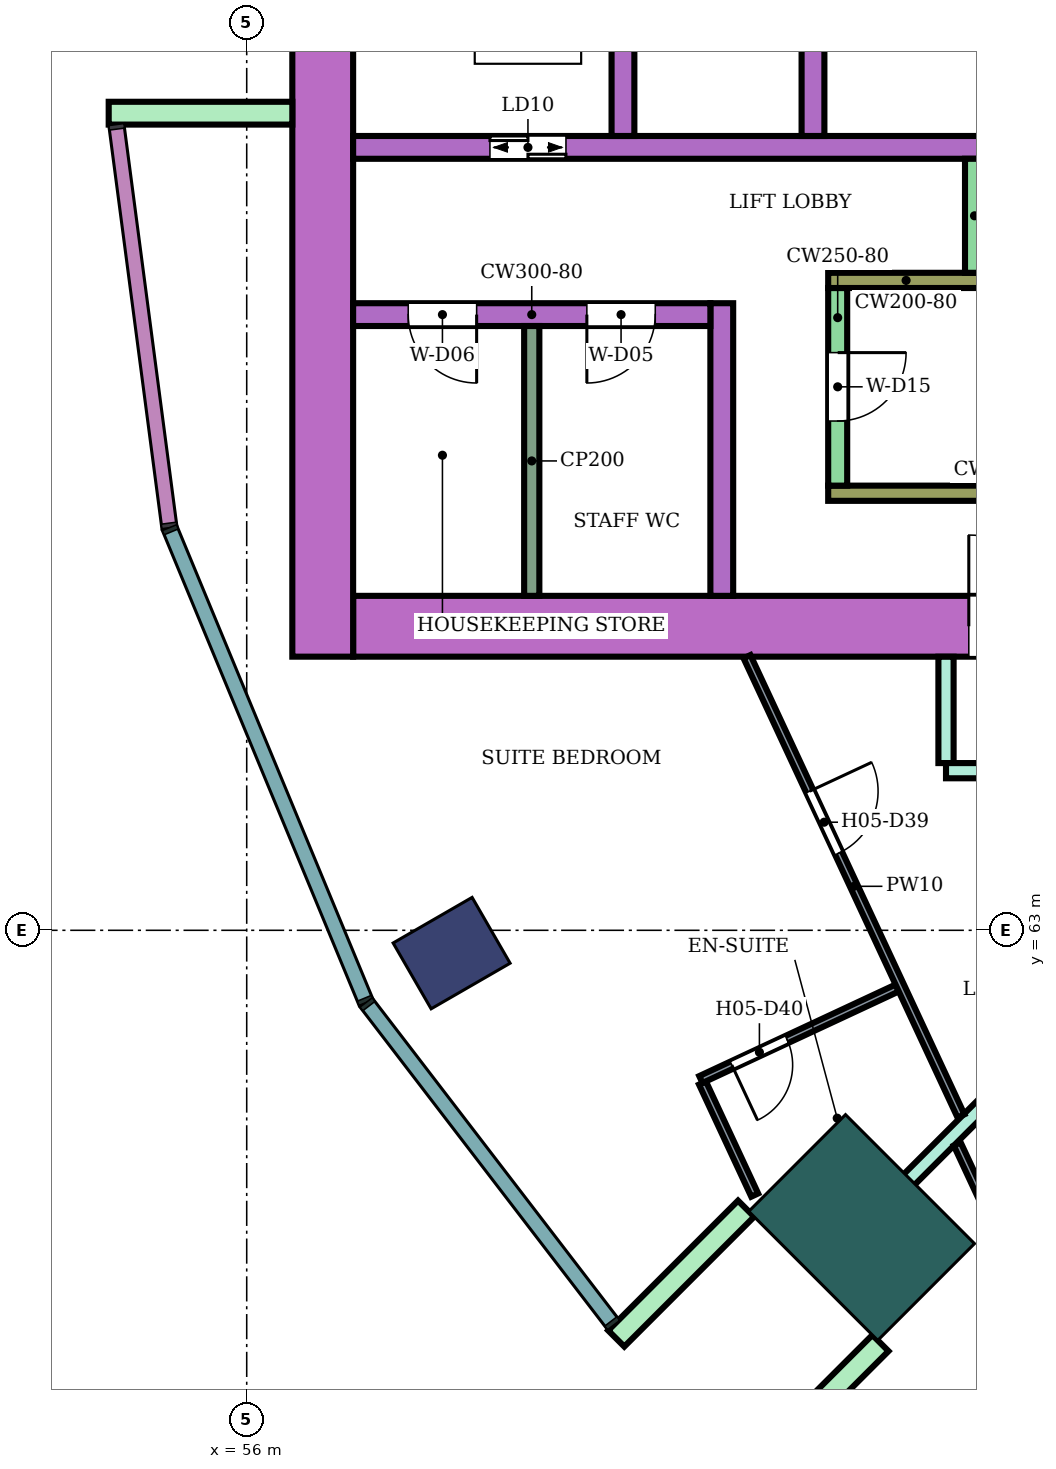
"""IFC4 building model, lengths in metres.
Left out: names, types, materials, properties, quantities, classifications, styles, units other than length and angle.
Written with IfcOpenShell. Run it as: python <this file> out.ifc"""

import sys

from ifc_helpers import new_model, si_unit, direction, frame, frame_2d, origin, origin_2d, place, context, subcontext, project, spatial, rectangle, extrude, element, fill, save


model = new_model("IFC4")
c1 = context("Model", 3, precision=1e-05, world=origin(), true_north=direction((0.0, 1.0)))
c2 = subcontext(c1, "Body", "Model", "MODEL_VIEW")
j1 = project(units=[si_unit("LENGTHUNIT", "METRE"), si_unit("PLANEANGLEUNIT", "RADIAN")], contexts=[c1])
p1 = place(None, origin())
s1 = spatial("IfcSite", under=j1, at=p1, CompositionType="ELEMENT")
p2 = place(p1, origin())
s2 = spatial("IfcBuilding", under=s1, at=p2, CompositionType="ELEMENT")
p3 = place(p2, frame((0.0, 0.0, 86.2)))
s3 = spatial("IfcBuildingStorey", under=s2, at=p3, CompositionType="ELEMENT", Elevation=86.2)
p4 = place(p3, frame((58.696, 62.7, 0.0), z_axis=(0.0, 0.0, 1.0), x_axis=(-0.866025403784, -0.5, 0.0)))
e1 = element("IfcColumn", 1, at=p4, inside=s3, PredefinedType="COLUMN", context=c2, shape_type="SweptSolid", body=[
    extrude(rectangle(XDim=1.2, YDim=1.0, at=origin_2d()), origin(), (0.0, 0.0, 1.0), 3.8),
])
p5 = place(p3, frame((64.09, 59.09, 0.0), z_axis=(0.0, 0.0, 1.0), x_axis=(-0.707106781187, -0.707106781187, 0.0)))
e2 = element("IfcColumn", 2, at=p5, inside=s3, PredefinedType="COLUMN", context=c2, shape_type="SweptSolid", body=[
    extrude(rectangle(XDim=1.8, YDim=2.4, at=origin_2d()), origin(), (0.0, 0.0, 1.0), 3.8),
])
p6 = place(p3, frame((72.1, 67.0, 0.0), z_axis=(0.0, 0.0, 1.0), x_axis=(-1.0, 0.0, 0.0)))
e3 = element("IfcWall", 3, at=p6, inside=s3, PredefinedType="SHEAR", context=c2, shape_type="SweptSolid", body=[
    extrude(rectangle(XDim=14.7, YDim=0.8, at=frame_2d((7.35, 0.0))), origin(), (0.0, 0.0, 1.0), 3.48),
])
p7 = place(p6, frame((4.2, 0.0, 0.0)))
e4 = element("IfcOpeningElement", 4, at=p7, cuts=e3, PredefinedType="OPENING", context=c2, shape_type="SweptSolid", body=[
    extrude(rectangle(XDim=2.4, YDim=2.4, at=frame_2d((1.2, 1.2))), frame((0.0, 0.41, 0.0), z_axis=(0.0, -1.0, 0.0), x_axis=(1.0, 0.0, 0.0)), (0.0, 0.0, 1.0), 0.82),
])
p8 = place(p3, frame((57.0, 83.4, 0.0), z_axis=(0.0, 0.0, 1.0), x_axis=(0.0, -1.0, 0.0)))
e5 = element("IfcWall", 5, at=p8, inside=s3, PredefinedType="SHEAR", context=c2, shape_type="SweptSolid", body=[
    extrude(rectangle(XDim=16.8, YDim=0.8, at=frame_2d((8.4, 0.0))), origin(), (0.0, 0.0, 1.0), 3.48),
])
p9 = place(p3, frame((68.3, 73.3, 0.0), z_axis=(0.0, 0.0, 1.0), x_axis=(-1.0, 0.0, 0.0)))
e6 = element("IfcWall", 6, at=p9, inside=s3, PredefinedType="SHEAR", context=c2, shape_type="SweptSolid", body=[
    extrude(rectangle(XDim=10.9, YDim=0.3, at=frame_2d((5.45, 0.0))), origin(), (0.0, 0.0, 1.0), 3.48),
])
p10 = place(p9, frame((0.55, 0.0, 0.0)))
e7 = element("IfcOpeningElement", 7, at=p10, cuts=e6, PredefinedType="OPENING", context=c2, shape_type="SweptSolid", body=[
    extrude(rectangle(XDim=1.1, YDim=2.1, at=frame_2d((0.55, 1.05))), frame((0.0, 0.16, 0.0), z_axis=(0.0, -1.0, 0.0), x_axis=(1.0, 0.0, 0.0)), (0.0, 0.0, 1.0), 0.32),
])
p11 = place(p9, frame((8.1, 0.0, 0.0)))
e8 = element("IfcOpeningElement", 8, at=p11, cuts=e6, PredefinedType="OPENING", context=c2, shape_type="SweptSolid", body=[
    extrude(rectangle(XDim=1.0, YDim=2.1, at=frame_2d((0.5, 1.05))), frame((0.0, 0.16, 0.0), z_axis=(0.0, -1.0, 0.0), x_axis=(1.0, 0.0, 0.0)), (0.0, 0.0, 1.0), 0.32),
])
for number, where, z_axis, x_axis in (
    (9, (63.45, 76.0, 0.0), (0.0, 0.0, 1.0), (0.0, -1.0, 0.0)),
    (10, (60.95, 76.0, 0.0), (0.0, 0.0, 1.0), (0.0, -1.0, 0.0)),
):
    element("IfcWall", number, at=place(p3, frame(where, z_axis=z_axis, x_axis=x_axis)), inside=s3, PredefinedType="SHEAR", context=c2, shape_type="SweptSolid", body=[
        extrude(rectangle(XDim=2.55, YDim=0.3, at=frame_2d((1.275, 0.0))), origin(), (0.0, 0.0, 1.0), 3.48),
    ])
p12 = place(p3, frame((68.3, 68.75, 0.0), z_axis=(0.0, 0.0, 1.0), x_axis=(-1.0, 0.0, 0.0)))
e11 = element("IfcWall", 11, at=p12, inside=s3, PredefinedType="SHEAR", context=c2, shape_type="SweptSolid", body=[
    extrude(rectangle(XDim=4.65, YDim=0.2, at=frame_2d((2.325, 0.0))), origin(), (0.0, 0.0, 1.0), 3.48),
])
p13 = place(p3, frame((63.775, 71.45, 0.0), z_axis=(0.0, 0.0, 1.0), x_axis=(0.0, -1.0, 0.0)))
e12 = element("IfcWall", 12, at=p13, inside=s3, PredefinedType="SHEAR", context=c2, shape_type="SweptSolid", body=[
    extrude(rectangle(XDim=2.6, YDim=0.25, at=frame_2d((1.3, 0.0))), origin(), (0.0, 0.0, 1.0), 3.48),
])
p14 = place(p13, frame((0.85, 0.0, 0.0)))
e13 = element("IfcOpeningElement", 13, at=p14, cuts=e12, PredefinedType="OPENING", context=c2, shape_type="SweptSolid", body=[
    extrude(rectangle(XDim=0.9, YDim=2.1, at=frame_2d((0.45, 1.05))), frame((0.0, 0.135, 0.0), z_axis=(0.0, -1.0, 0.0), x_axis=(1.0, 0.0, 0.0)), (0.0, 0.0, 1.0), 0.27),
])
p15 = place(p3, frame((65.7, 71.55, 0.0), z_axis=(0.0, 0.0, 1.0), x_axis=(-1.0, 0.0, 0.0)))
e14 = element("IfcWall", 14, at=p15, inside=s3, PredefinedType="SHEAR", context=c2, shape_type="SweptSolid", body=[
    extrude(rectangle(XDim=2.05, YDim=0.2, at=frame_2d((1.025, 0.0))), origin(), (0.0, 0.0, 1.0), 3.48),
])
p16 = place(p3, frame((65.575, 73.15, 0.0), z_axis=(0.0, 0.0, 1.0), x_axis=(0.0, -1.0, 0.0)))
e15 = element("IfcWall", 15, at=p16, inside=s3, PredefinedType="SHEAR", context=c2, shape_type="SweptSolid", body=[
    extrude(rectangle(XDim=1.5, YDim=0.25, at=frame_2d((0.75, 0.0))), origin(), (0.0, 0.0, 1.0), 3.48),
])
p17 = place(p3, frame((62.25, 71.25, 0.0), z_axis=(0.0, 0.0, 1.0), x_axis=(0.0, -1.0, 0.0)))
e16 = element("IfcWall", 16, at=p17, inside=s3, PredefinedType="SHEAR", context=c2, shape_type="SweptSolid", body=[
    extrude(rectangle(XDim=3.85, YDim=0.3, at=frame_2d((1.925, 0.0))), origin(), (0.0, 0.0, 1.0), 3.48),
])
p18 = place(p3, frame((62.1, 71.1, 0.0), z_axis=(0.0, 0.0, 1.0), x_axis=(-1.0, 0.0, 0.0)))
e17 = element("IfcWall", 17, at=p18, inside=s3, PredefinedType="SHEAR", context=c2, shape_type="SweptSolid", body=[
    extrude(rectangle(XDim=4.7, YDim=0.3, at=frame_2d((2.35, 0.0))), origin(), (0.0, 0.0, 1.0), 3.48),
])
p19 = place(p18, frame((0.725, 0.0, 0.0)))
e18 = element("IfcOpeningElement", 18, at=p19, cuts=e17, PredefinedType="OPENING", context=c2, shape_type="SweptSolid", body=[
    extrude(rectangle(XDim=0.9, YDim=2.1, at=frame_2d((0.45, 1.05))), frame((0.0, 0.16, 0.0), z_axis=(0.0, -1.0, 0.0), x_axis=(1.0, 0.0, 0.0)), (0.0, 0.0, 1.0), 0.32),
])
p20 = place(p18, frame((3.075, 0.0, 0.0)))
e19 = element("IfcOpeningElement", 19, at=p20, cuts=e17, PredefinedType="OPENING", context=c2, shape_type="SweptSolid", body=[
    extrude(rectangle(XDim=0.9, YDim=2.1, at=frame_2d((0.45, 1.05))), frame((0.0, 0.16, 0.0), z_axis=(0.0, -1.0, 0.0), x_axis=(1.0, 0.0, 0.0)), (0.0, 0.0, 1.0), 0.32),
])
for number, where, z_axis, x_axis in (
    (20, (56.6, 73.75, 0.0), (0.0, 0.0, 1.0), (-1.0, 0.0, 0.0)),
    (21, (62.57, 59.338, 0.0), (0.0, 0.0, 1.0), (-0.707, -0.707, 0.0)),
    (22, (64.338, 57.57, 0.0), (0.0, 0.0, 1.0), (-0.707, -0.707, 0.0)),
):
    element("IfcWall", number, at=place(p3, frame(where, z_axis=z_axis, x_axis=x_axis)), inside=s3, PredefinedType="NOTDEFINED", context=c2, shape_type="SweptSolid", body=[
        extrude(rectangle(XDim=2.416, YDim=0.3, at=frame_2d((1.208, 0.0))), origin(), (0.0, 0.0, 1.0), 3.8),
    ])
p21 = place(p3, frame((63.593, 58.599, 0.0), z_axis=(0.0, 0.0, 1.0), x_axis=(0.707292874152, 0.706920639233, 0.0)))
e23 = element("IfcWall", 23, at=p21, inside=s3, PredefinedType="PARTITIONING", context=c2, shape_type="SweptSolid", body=[
    extrude(rectangle(XDim=5.247, YDim=0.2, at=frame_2d((2.624, 0.0))), origin(), (0.0, 0.0, 1.0), 3.35),
])
p22 = place(p3, frame((65.2, 65.2, 0.0), z_axis=(0.0, 0.0, 1.0), x_axis=(0.0, 1.0, 0.0)))
e24 = element("IfcWall", 24, at=p22, inside=s3, PredefinedType="PARTITIONING", context=c2, shape_type="SweptSolid", body=[
    extrude(rectangle(XDim=1.399, YDim=0.2, at=frame_2d((0.7, 0.0))), origin(), (0.0, 0.0, 1.0), 3.35),
])
p23 = place(p3, frame((65.2, 65.1, 0.0), z_axis=(0.0, 0.0, 1.0), x_axis=(1.0, 0.0, 0.0)))
e25 = element("IfcWall", 25, at=p23, inside=s3, PredefinedType="PARTITIONING", context=c2, shape_type="SweptSolid", body=[
    extrude(rectangle(XDim=0.859, YDim=0.2, at=frame_2d((0.43, 0.0))), origin(), (0.0, 0.0, 1.0), 3.35),
])
p24 = place(p3, frame((61.996, 60.992, 0.0), z_axis=(0.0, 0.0, 1.0), x_axis=(0.422318684634, -0.906447421867, 0.0)))
e26 = element("IfcWall", 26, at=p24, inside=s3, PredefinedType="PARTITIONING", context=c2, shape_type="SweptSolid", body=[
    extrude(rectangle(XDim=1.627, YDim=0.1, at=frame_2d((0.814, 0.0))), origin(), (0.0, 0.0, 1.0), 3.35),
])
p25 = place(p3, frame((61.975, 61.037, 0.0), z_axis=(0.0, 0.0, 1.0), x_axis=(0.906360368959, 0.422505481125, 0.0)))
e27 = element("IfcWall", 27, at=p25, inside=s3, PredefinedType="PARTITIONING", context=c2, shape_type="SweptSolid", body=[
    extrude(rectangle(XDim=2.849, YDim=0.1, at=frame_2d((1.425, 0.0))), origin(), (0.0, 0.0, 1.0), 3.35),
])
p26 = place(p25, frame((0.45, 0.0, 0.0)))
e28 = element("IfcOpeningElement", 28, at=p26, cuts=e27, PredefinedType="OPENING", context=c2, shape_type="SweptSolid", body=[
    extrude(rectangle(XDim=0.8, YDim=2.1, at=frame_2d((0.4, 1.05))), frame((0.0, 0.06, 0.0), z_axis=(0.0, -1.0, 0.0), x_axis=(1.0, 0.0, 0.0)), (0.0, 0.0, 1.0), 0.12),
])
p27 = place(p3, frame((62.582, 66.6, 0.0), z_axis=(0.0, 0.0, 1.0), x_axis=(0.422283870085, -0.906463641337, 0.0)))
e29 = element("IfcWall", 29, at=p27, inside=s3, PredefinedType="PARTITIONING", context=c2, shape_type="SweptSolid", body=[
    extrude(rectangle(XDim=6.666, YDim=0.1, at=frame_2d((3.333, 0.0))), origin(), (0.0, 0.0, 1.0), 3.35),
])
p28 = place(p27, frame((1.953, 0.0, 0.0)))
e30 = element("IfcOpeningElement", 30, at=p28, cuts=e29, PredefinedType="OPENING", context=c2, shape_type="SweptSolid", body=[
    extrude(rectangle(XDim=0.9, YDim=2.1, at=frame_2d((0.45, 1.05))), frame((0.0, 0.06, 0.0), z_axis=(0.0, -1.0, 0.0), x_axis=(1.0, 0.0, 0.0)), (0.0, 0.0, 1.0), 0.12),
])
p29 = place(p3, frame((65.348, 60.188, 0.0), z_axis=(0.0, 0.0, 1.0), x_axis=(0.422387529151, -0.906415343657, 0.0)))
e31 = element("IfcWall", 31, at=p29, inside=s3, PredefinedType="PARTITIONING", context=c2, shape_type="SweptSolid", body=[
    extrude(rectangle(XDim=1.208, YDim=0.1, at=frame_2d((0.604, 0.0))), origin(), (0.0, 0.0, 1.0), 3.35),
])
p30 = place(p3, frame((59.75, 70.95, 0.0), z_axis=(0.0, 0.0, 1.0), x_axis=(0.0, -1.0, 0.0)))
e32 = element("IfcWall", 32, at=p30, inside=s3, PredefinedType="PARTITIONING", context=c2, shape_type="SweptSolid", body=[
    extrude(rectangle(XDim=3.55, YDim=0.2, at=frame_2d((1.775, 0.0))), origin(), (0.0, 0.0, 1.0), 3.48),
])
p31 = place(p28, origin())
e33 = element("IfcDoor", 33, at=p31, inside=s3, OperationType="SINGLE_SWING_LEFT", PredefinedType="DOOR", context=c2, shape_type="SweptSolid", body=[
    extrude(rectangle(XDim=0.9, YDim=2.1, at=frame_2d((0.45, 1.05))), frame((0.0, 0.025, 0.0), z_axis=(0.0, -1.0, 0.0), x_axis=(1.0, 0.0, 0.0)), (0.0, 0.0, 1.0), 0.05),
])
fill(e30, e33)
p32 = place(p26, frame((0.8, 0.0, 0.0), z_axis=(0.0, 0.0, 1.0), x_axis=(-1.0, 0.0, 0.0)))
e34 = element("IfcDoor", 34, at=p32, inside=s3, OperationType="SINGLE_SWING_RIGHT", PredefinedType="DOOR", context=c2, shape_type="SweptSolid", body=[
    extrude(rectangle(XDim=0.8, YDim=2.1, at=frame_2d((0.4, 1.05))), frame((0.0, 0.025, 0.0), z_axis=(0.0, -1.0, 0.0), x_axis=(1.0, 0.0, 0.0)), (0.0, 0.0, 1.0), 0.05),
])
fill(e28, e34)
p33 = place(p11, origin())
e35 = element("IfcDoor", 35, at=p33, inside=s3, OperationType="DOUBLE_DOOR_SLIDING", PredefinedType="DOOR", context=c2, shape_type="SweptSolid", body=[
    extrude(rectangle(XDim=1.0, YDim=2.1, at=frame_2d((0.5, 1.05))), frame((0.0, 0.025, 0.0), z_axis=(0.0, -1.0, 0.0), x_axis=(1.0, 0.0, 0.0)), (0.0, 0.0, 1.0), 0.05),
])
fill(e8, e35)
p34 = place(p14, origin())
e36 = element("IfcDoor", 36, at=p34, inside=s3, OperationType="SINGLE_SWING_LEFT", PredefinedType="DOOR", context=c2, shape_type="SweptSolid", body=[
    extrude(rectangle(XDim=0.9, YDim=2.1, at=frame_2d((0.45, 1.05))), frame((0.0, 0.025, 0.0), z_axis=(0.0, -1.0, 0.0), x_axis=(1.0, 0.0, 0.0)), (0.0, 0.0, 1.0), 0.05),
])
fill(e13, e36)
p35 = place(p19, origin())
e37 = element("IfcDoor", 37, at=p35, inside=s3, OperationType="SINGLE_SWING_RIGHT", PredefinedType="DOOR", context=c2, shape_type="SweptSolid", body=[
    extrude(rectangle(XDim=0.9, YDim=2.1, at=frame_2d((0.45, 1.05))), frame((0.0, 0.025, 0.0), z_axis=(0.0, -1.0, 0.0), x_axis=(1.0, 0.0, 0.0)), (0.0, 0.0, 1.0), 0.05),
])
fill(e18, e37)
p36 = place(p20, origin())
e38 = element("IfcDoor", 38, at=p36, inside=s3, OperationType="SINGLE_SWING_LEFT", PredefinedType="DOOR", context=c2, shape_type="SweptSolid", body=[
    extrude(rectangle(XDim=0.9, YDim=2.1, at=frame_2d((0.45, 1.05))), frame((0.0, 0.025, 0.0), z_axis=(0.0, -1.0, 0.0), x_axis=(1.0, 0.0, 0.0)), (0.0, 0.0, 1.0), 0.05),
])
fill(e19, e38)
p37 = place(p7, frame((2.4, 0.0, 0.0), z_axis=(0.0, 0.0, 1.0), x_axis=(-1.0, 0.0, 0.0)))
e39 = element("IfcDoor", 39, at=p37, inside=s3, OperationType="DOUBLE_DOOR_SINGLE_SWING", PredefinedType="DOOR", context=c2, shape_type="SweptSolid", body=[
    extrude(rectangle(XDim=2.4, YDim=2.4, at=frame_2d((1.2, 1.2))), frame((0.0, 0.025, 0.0), z_axis=(0.0, -1.0, 0.0), x_axis=(1.0, 0.0, 0.0)), (0.0, 0.0, 1.0), 0.05),
])
fill(e4, e39)
save(model, sys.argv[1])
